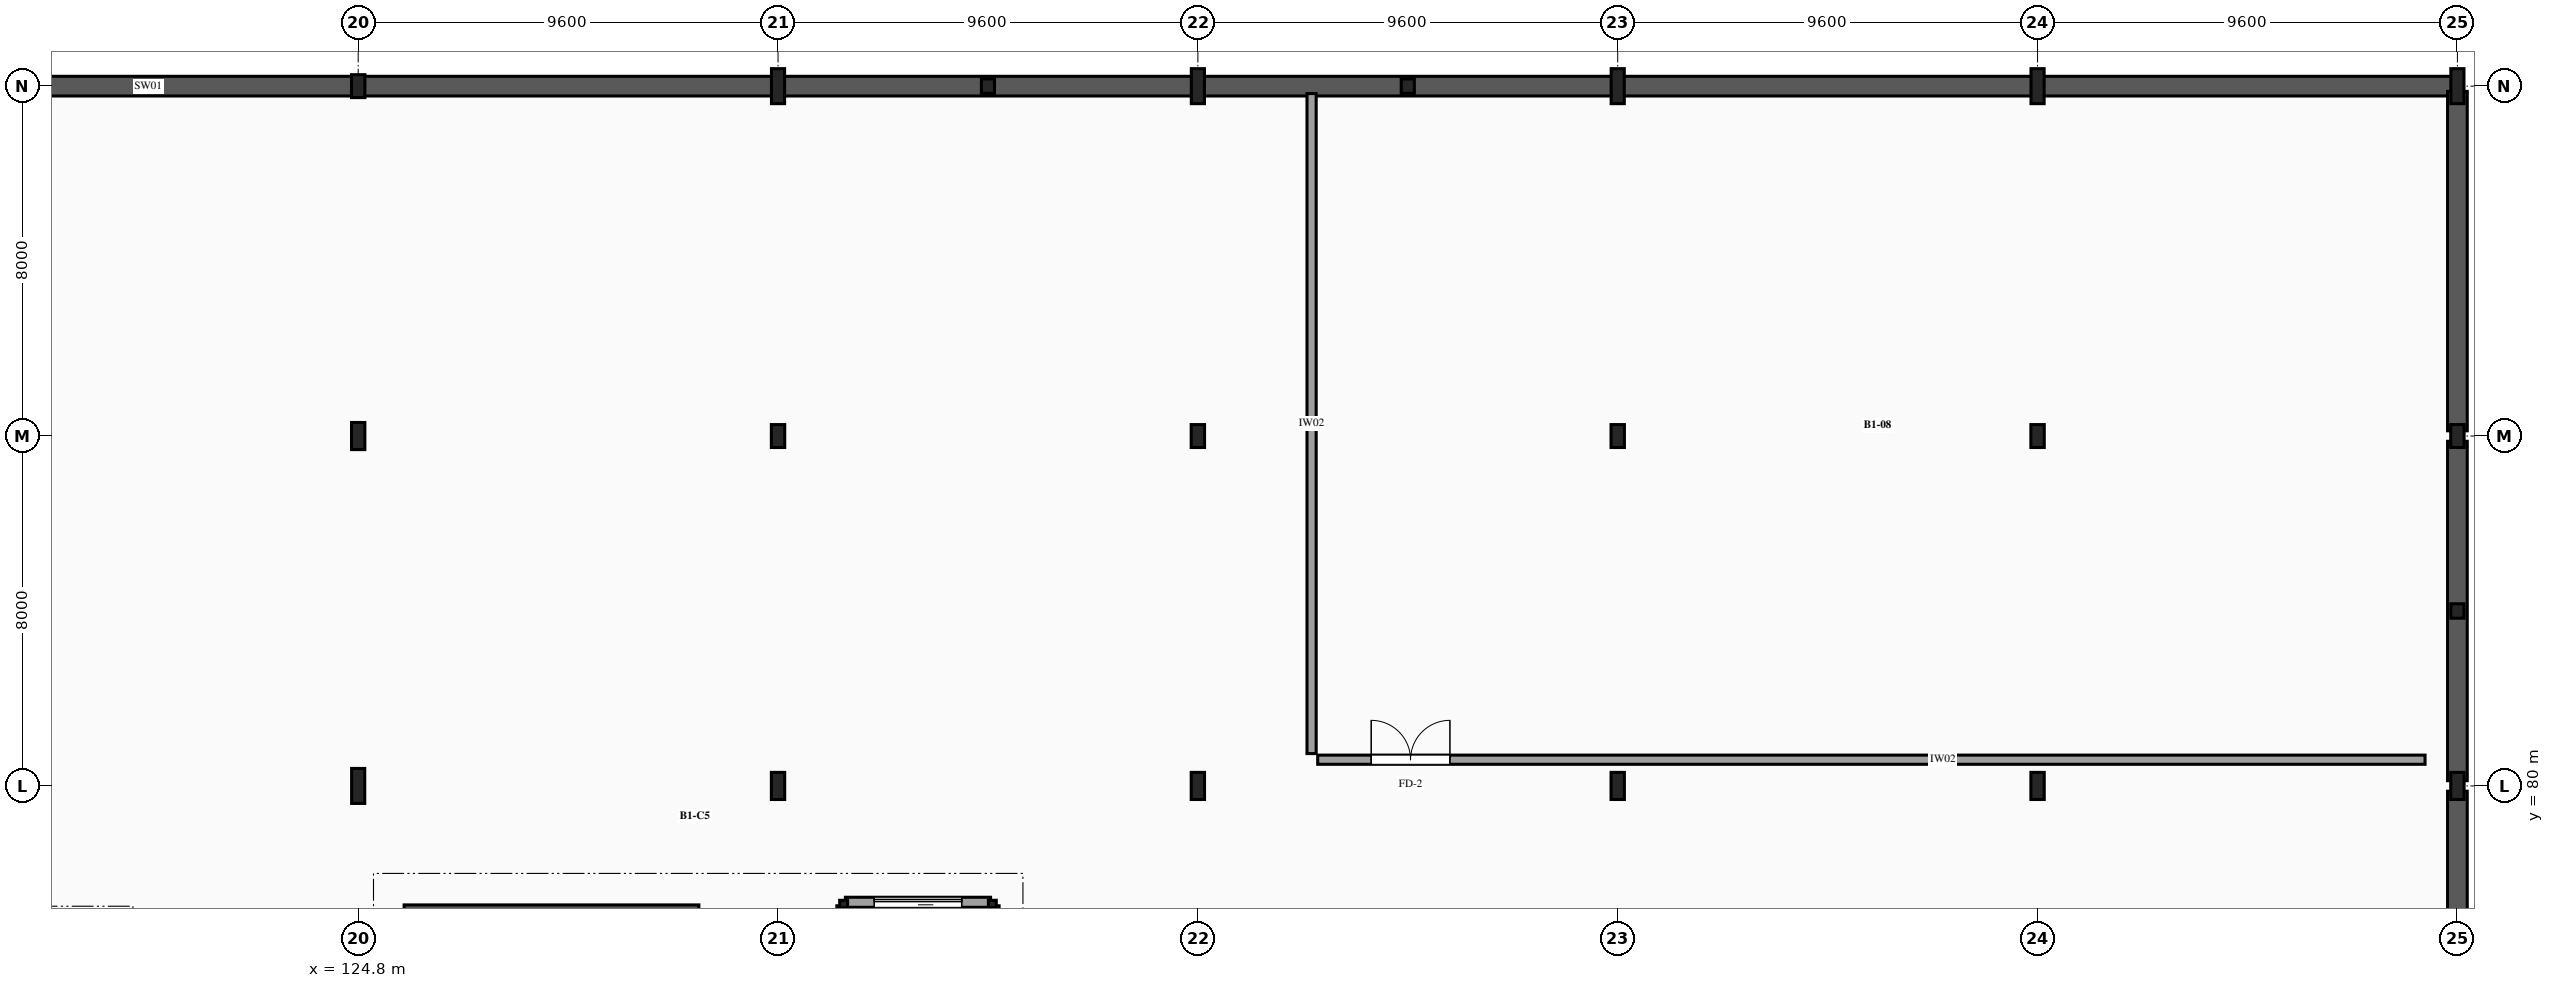
"""IFC4 building model, lengths in metres.
Left out: names, types, materials, properties, quantities, classifications, styles, units other than length and angle.
Written with IfcOpenShell. Run it as: python <this file> out.ifc"""

import sys

from ifc_helpers import new_model, si_unit, direction, frame, frame_2d, origin, origin_2d, place, context, subcontext, project, spatial, rectangle, i_section, extrude, element, fill, save


model = new_model("IFC4")
c1 = context("Model", 3, precision=1e-05, world=origin(), true_north=direction((0.0, 1.0)))
c2 = subcontext(c1, "Body", "Model", "MODEL_VIEW")
j1 = project(units=[si_unit("LENGTHUNIT", "METRE"), si_unit("PLANEANGLEUNIT", "RADIAN")], contexts=[c1])
p1 = place(None, origin())
s1 = spatial("IfcSite", under=j1, at=p1, CompositionType="ELEMENT")
p2 = place(p1, origin())
s2 = spatial("IfcBuilding", under=s1, at=p2, CompositionType="ELEMENT")
p3 = place(p2, frame((0.0, 0.0, -4.5)))
s3 = spatial("IfcBuildingStorey", under=s2, at=p3, CompositionType="ELEMENT", Elevation=-4.5)
p4 = place(p3, frame((124.8, 80.0, 0.0), z_axis=(0.0, 0.0, 1.0), x_axis=(1.0, 0.0, 0.0)))
e1 = element("IfcColumn", 1, at=p4, inside=s3, PredefinedType="COLUMN", context=c2, shape_type="SweptSolid", body=[
    extrude(i_section(OverallWidth=0.3, OverallDepth=0.8, WebThickness=0.018, FlangeThickness=0.033, FilletRadius=0.03, at=origin_2d()), origin(), (0.0, 0.0, 1.0), 4.22),
])
p5 = place(p3, frame((124.8, 88.0, 0.0), z_axis=(0.0, 0.0, 1.0), x_axis=(1.0, 0.0, 0.0)))
e2 = element("IfcColumn", 2, at=p5, inside=s3, PredefinedType="COLUMN", context=c2, shape_type="SweptSolid", body=[
    extrude(i_section(OverallWidth=0.305, OverallDepth=0.62, WebThickness=0.021, FlangeThickness=0.04, FilletRadius=0.027, at=origin_2d()), origin(), (0.0, 0.0, 1.0), 4.22),
])
p6 = place(p3, frame((124.8, 96.0, 0.0), z_axis=(0.0, 0.0, 1.0), x_axis=(1.0, 0.0, 0.0)))
e3 = element("IfcColumn", 3, at=p6, inside=s3, PredefinedType="COLUMN", context=c2, shape_type="SweptSolid", body=[
    extrude(i_section(OverallWidth=0.306, OverallDepth=0.524, WebThickness=0.021, FlangeThickness=0.04, FilletRadius=0.027, at=origin_2d()), origin(), (0.0, 0.0, 1.0), 4.22),
])
p7 = place(p3, frame((134.4, 80.0, 0.0), z_axis=(0.0, 0.0, 1.0), x_axis=(1.0, 0.0, 0.0)))
e4 = element("IfcColumn", 4, at=p7, inside=s3, PredefinedType="COLUMN", context=c2, shape_type="SweptSolid", body=[
    extrude(i_section(OverallWidth=0.305, OverallDepth=0.62, WebThickness=0.021, FlangeThickness=0.04, FilletRadius=0.027, at=origin_2d()), origin(), (0.0, 0.0, 1.0), 4.22),
])
p8 = place(p3, frame((134.4, 88.0, 0.0), z_axis=(0.0, 0.0, 1.0), x_axis=(1.0, 0.0, 0.0)))
e5 = element("IfcColumn", 5, at=p8, inside=s3, PredefinedType="COLUMN", context=c2, shape_type="SweptSolid", body=[
    extrude(i_section(OverallWidth=0.306, OverallDepth=0.524, WebThickness=0.021, FlangeThickness=0.04, FilletRadius=0.027, at=origin_2d()), origin(), (0.0, 0.0, 1.0), 4.22),
])
p9 = place(p3, frame((134.4, 96.0, 0.0), z_axis=(0.0, 0.0, 1.0), x_axis=(1.0, 0.0, 0.0)))
e6 = element("IfcColumn", 6, at=p9, inside=s3, PredefinedType="COLUMN", context=c2, shape_type="SweptSolid", body=[
    extrude(i_section(OverallWidth=0.3, OverallDepth=0.8, WebThickness=0.018, FlangeThickness=0.033, FilletRadius=0.03, at=origin_2d()), origin(), (0.0, 0.0, 1.0), 4.22),
])
p10 = place(p3, frame((144.0, 80.0, 0.0), z_axis=(0.0, 0.0, 1.0), x_axis=(1.0, 0.0, 0.0)))
e7 = element("IfcColumn", 7, at=p10, inside=s3, PredefinedType="COLUMN", context=c2, shape_type="SweptSolid", body=[
    extrude(i_section(OverallWidth=0.305, OverallDepth=0.62, WebThickness=0.021, FlangeThickness=0.04, FilletRadius=0.027, at=origin_2d()), origin(), (0.0, 0.0, 1.0), 4.22),
])
p11 = place(p3, frame((144.0, 88.0, 0.0), z_axis=(0.0, 0.0, 1.0), x_axis=(1.0, 0.0, 0.0)))
e8 = element("IfcColumn", 8, at=p11, inside=s3, PredefinedType="COLUMN", context=c2, shape_type="SweptSolid", body=[
    extrude(i_section(OverallWidth=0.306, OverallDepth=0.524, WebThickness=0.021, FlangeThickness=0.04, FilletRadius=0.027, at=origin_2d()), origin(), (0.0, 0.0, 1.0), 4.22),
])
p12 = place(p3, frame((144.0, 96.0, 0.0), z_axis=(0.0, 0.0, 1.0), x_axis=(1.0, 0.0, 0.0)))
e9 = element("IfcColumn", 9, at=p12, inside=s3, PredefinedType="COLUMN", context=c2, shape_type="SweptSolid", body=[
    extrude(i_section(OverallWidth=0.3, OverallDepth=0.8, WebThickness=0.018, FlangeThickness=0.033, FilletRadius=0.03, at=origin_2d()), origin(), (0.0, 0.0, 1.0), 4.22),
])
p13 = place(p3, frame((153.6, 80.0, 0.0), z_axis=(0.0, 0.0, 1.0), x_axis=(1.0, 0.0, 0.0)))
e10 = element("IfcColumn", 10, at=p13, inside=s3, PredefinedType="COLUMN", context=c2, shape_type="SweptSolid", body=[
    extrude(i_section(OverallWidth=0.305, OverallDepth=0.62, WebThickness=0.021, FlangeThickness=0.04, FilletRadius=0.027, at=origin_2d()), origin(), (0.0, 0.0, 1.0), 4.22),
])
p14 = place(p3, frame((153.6, 88.0, 0.0), z_axis=(0.0, 0.0, 1.0), x_axis=(1.0, 0.0, 0.0)))
e11 = element("IfcColumn", 11, at=p14, inside=s3, PredefinedType="COLUMN", context=c2, shape_type="SweptSolid", body=[
    extrude(i_section(OverallWidth=0.306, OverallDepth=0.524, WebThickness=0.021, FlangeThickness=0.04, FilletRadius=0.027, at=origin_2d()), origin(), (0.0, 0.0, 1.0), 4.22),
])
p15 = place(p3, frame((153.6, 96.0, 0.0), z_axis=(0.0, 0.0, 1.0), x_axis=(1.0, 0.0, 0.0)))
e12 = element("IfcColumn", 12, at=p15, inside=s3, PredefinedType="COLUMN", context=c2, shape_type="SweptSolid", body=[
    extrude(i_section(OverallWidth=0.3, OverallDepth=0.8, WebThickness=0.018, FlangeThickness=0.033, FilletRadius=0.03, at=origin_2d()), origin(), (0.0, 0.0, 1.0), 4.22),
])
p16 = place(p3, frame((163.2, 80.0, 0.0), z_axis=(0.0, 0.0, 1.0), x_axis=(1.0, 0.0, 0.0)))
e13 = element("IfcColumn", 13, at=p16, inside=s3, PredefinedType="COLUMN", context=c2, shape_type="SweptSolid", body=[
    extrude(i_section(OverallWidth=0.305, OverallDepth=0.62, WebThickness=0.021, FlangeThickness=0.04, FilletRadius=0.027, at=origin_2d()), origin(), (0.0, 0.0, 1.0), 4.22),
])
p17 = place(p3, frame((163.2, 88.0, 0.0), z_axis=(0.0, 0.0, 1.0), x_axis=(1.0, 0.0, 0.0)))
e14 = element("IfcColumn", 14, at=p17, inside=s3, PredefinedType="COLUMN", context=c2, shape_type="SweptSolid", body=[
    extrude(i_section(OverallWidth=0.306, OverallDepth=0.524, WebThickness=0.021, FlangeThickness=0.04, FilletRadius=0.027, at=origin_2d()), origin(), (0.0, 0.0, 1.0), 4.22),
])
p18 = place(p3, frame((163.2, 96.0, 0.0), z_axis=(0.0, 0.0, 1.0), x_axis=(1.0, 0.0, 0.0)))
e15 = element("IfcColumn", 15, at=p18, inside=s3, PredefinedType="COLUMN", context=c2, shape_type="SweptSolid", body=[
    extrude(i_section(OverallWidth=0.3, OverallDepth=0.8, WebThickness=0.018, FlangeThickness=0.033, FilletRadius=0.03, at=origin_2d()), origin(), (0.0, 0.0, 1.0), 4.22),
])
p19 = place(p3, frame((172.8, 80.0, 0.0), z_axis=(0.0, 0.0, 1.0), x_axis=(1.0, 0.0, 0.0)))
e16 = element("IfcColumn", 16, at=p19, inside=s3, PredefinedType="COLUMN", context=c2, shape_type="SweptSolid", body=[
    extrude(i_section(OverallWidth=0.305, OverallDepth=0.62, WebThickness=0.021, FlangeThickness=0.04, FilletRadius=0.027, at=origin_2d()), origin(), (0.0, 0.0, 1.0), 4.22),
])
p20 = place(p3, frame((172.8, 88.0, 0.0), z_axis=(0.0, 0.0, 1.0), x_axis=(1.0, 0.0, 0.0)))
e17 = element("IfcColumn", 17, at=p20, inside=s3, PredefinedType="COLUMN", context=c2, shape_type="SweptSolid", body=[
    extrude(i_section(OverallWidth=0.306, OverallDepth=0.524, WebThickness=0.021, FlangeThickness=0.04, FilletRadius=0.027, at=origin_2d()), origin(), (0.0, 0.0, 1.0), 4.22),
])
p21 = place(p3, frame((172.8, 96.0, 0.0), z_axis=(0.0, 0.0, 1.0), x_axis=(1.0, 0.0, 0.0)))
e18 = element("IfcColumn", 18, at=p21, inside=s3, PredefinedType="COLUMN", context=c2, shape_type="SweptSolid", body=[
    extrude(i_section(OverallWidth=0.3, OverallDepth=0.8, WebThickness=0.018, FlangeThickness=0.033, FilletRadius=0.03, at=origin_2d()), origin(), (0.0, 0.0, 1.0), 4.22),
])
for number, where, z_axis, x_axis in (
    (19, (172.8, 84.0, 0.0), (0.0, 0.0, 1.0), (1.0, 0.0, 0.0)),
    (20, (139.2, 96.0, 0.0), (0.0, 0.0, 1.0), (1.0, 0.0, 0.0)),
    (21, (148.8, 96.0, 0.0), (0.0, 0.0, 1.0), (1.0, 0.0, 0.0)),
):
    element("IfcColumn", number, at=place(p3, frame(where, z_axis=z_axis, x_axis=x_axis)), inside=s3, PredefinedType="PILASTER", context=c2, shape_type="SweptSolid", body=[
        extrude(i_section(OverallWidth=0.3, OverallDepth=0.33, WebThickness=0.01, FlangeThickness=0.017, FilletRadius=0.027, at=origin_2d()), origin(), (0.0, 0.0, 1.0), 4.22),
    ])
p22 = place(p3, frame((115.32, 96.0, 0.0), z_axis=(0.0, 0.0, 1.0), x_axis=(1.0, 0.0, 0.0)))
e22 = element("IfcWall", 22, at=p22, inside=s3, PredefinedType="SHEAR", context=c2, shape_type="SweptSolid", body=[
    extrude(rectangle(XDim=9.36, YDim=0.45, at=frame_2d((4.68, 0.0))), origin(), (0.0, 0.0, 1.0), 4.22),
])
p23 = place(p3, frame((124.92, 96.0, 0.0), z_axis=(0.0, 0.0, 1.0), x_axis=(1.0, 0.0, 0.0)))
e23 = element("IfcWall", 23, at=p23, inside=s3, PredefinedType="SHEAR", context=c2, shape_type="SweptSolid", body=[
    extrude(rectangle(XDim=9.36, YDim=0.45, at=frame_2d((4.68, 0.0))), origin(), (0.0, 0.0, 1.0), 4.22),
])
for number, where, z_axis, x_axis in (
    (24, (134.52, 96.0, 0.0), (0.0, 0.0, 1.0), (1.0, 0.0, 0.0)),
    (25, (144.12, 96.0, 0.0), (0.0, 0.0, 1.0), (1.0, 0.0, 0.0)),
):
    element("IfcWall", number, at=place(p3, frame(where, z_axis=z_axis, x_axis=x_axis)), inside=s3, PredefinedType="SHEAR", context=c2, shape_type="SweptSolid", body=[
        extrude(rectangle(XDim=9.36, YDim=0.45, at=frame_2d((4.68, 0.0))), origin(), (0.0, 0.0, 1.0), 4.22),
    ])
p24 = place(p3, frame((153.72, 96.0, 0.0), z_axis=(0.0, 0.0, 1.0), x_axis=(1.0, 0.0, 0.0)))
e26 = element("IfcWall", 26, at=p24, inside=s3, PredefinedType="SHEAR", context=c2, shape_type="SweptSolid", body=[
    extrude(rectangle(XDim=9.36, YDim=0.45, at=frame_2d((4.68, 0.0))), origin(), (0.0, 0.0, 1.0), 4.22),
])
p25 = place(p3, frame((163.32, 96.0, 0.0), z_axis=(0.0, 0.0, 1.0), x_axis=(1.0, 0.0, 0.0)))
e27 = element("IfcWall", 27, at=p25, inside=s3, PredefinedType="SHEAR", context=c2, shape_type="SweptSolid", body=[
    extrude(rectangle(XDim=9.36, YDim=0.45, at=frame_2d((4.68, 0.0))), origin(), (0.0, 0.0, 1.0), 4.22),
])
for number, where, z_axis, x_axis in (
    (28, (172.8, 72.12, 0.0), (0.0, 0.0, 1.0), (0.0, 1.0, 0.0)),
    (29, (172.8, 80.12, 0.0), (0.0, 0.0, 1.0), (0.0, 1.0, 0.0)),
    (30, (172.8, 88.12, 0.0), (0.0, 0.0, 1.0), (0.0, 1.0, 0.0)),
):
    element("IfcWall", number, at=place(p3, frame(where, z_axis=z_axis, x_axis=x_axis)), inside=s3, PredefinedType="SHEAR", context=c2, shape_type="SweptSolid", body=[
        extrude(rectangle(XDim=7.76, YDim=0.45, at=frame_2d((3.88, 0.0))), origin(), (0.0, 0.0, 1.0), 4.22),
    ])
p26 = place(p3, frame((125.85, 77.12, 0.0), z_axis=(0.0, 0.0, 1.0), x_axis=(1.0, 0.0, 0.0)))
e31 = element("IfcWall", 31, at=p26, inside=s3, PredefinedType="SHEAR", context=c2, shape_type="SweptSolid", body=[
    extrude(rectangle(XDim=6.74, YDim=0.32, at=frame_2d((3.37, 0.0))), origin(), (0.0, 0.0, 1.0), 4.22),
])
for number, where, z_axis, x_axis in (
    (32, (139.3, 77.3, 0.0), (0.0, 0.0, 1.0), (1.0, 0.0, 0.0)),
    (33, (135.9, 77.3, 0.0), (0.0, 0.0, 1.0), (1.0, 0.0, 0.0)),
):
    element("IfcColumn", number, at=place(p3, frame(where, z_axis=z_axis, x_axis=x_axis)), inside=s3, PredefinedType="COLUMN", context=c2, shape_type="SweptSolid", body=[
        extrude(i_section(OverallWidth=0.18, OverallDepth=0.171, WebThickness=0.006, FlangeThickness=0.01, FilletRadius=0.015, at=origin_2d()), origin(), (0.0, 0.0, 1.0), 4.5),
    ])
p27 = place(p3, frame((135.94, 77.34, 0.0), z_axis=(0.0, 0.0, 1.0), x_axis=(1.0, 0.0, 0.0)))
e34 = element("IfcWall", 34, at=p27, inside=s3, PredefinedType="SOLIDWALL", context=c2, shape_type="SweptSolid", body=[
    extrude(rectangle(XDim=3.32, YDim=0.23, at=frame_2d((1.66, 0.0))), origin(), (0.0, 0.0, 1.0), 3.58),
])
p28 = place(p27, frame((0.66, 0.0, 0.0)))
e35 = element("IfcOpeningElement", 35, at=p28, cuts=e34, PredefinedType="OPENING", context=c2, shape_type="SweptSolid", body=[
    extrude(rectangle(XDim=2.0, YDim=2.5, at=frame_2d((1.0, 1.25))), frame((0.0, 0.125, 0.0), z_axis=(0.0, -1.0, 0.0), x_axis=(1.0, 0.0, 0.0)), (0.0, 0.0, 1.0), 0.25),
])
for number, where, z_axis, x_axis in (
    (36, (135.86, 73.14, 0.0), (0.0, 0.0, 1.0), (0.0, 1.0, 0.0)),
    (37, (139.34, 73.14, 0.0), (0.0, 0.0, 1.0), (0.0, 1.0, 0.0)),
):
    element("IfcWall", number, at=place(p3, frame(where, z_axis=z_axis, x_axis=x_axis)), inside=s3, PredefinedType="SOLIDWALL", context=c2, shape_type="SweptSolid", body=[
        extrude(rectangle(XDim=4.12, YDim=0.23, at=frame_2d((2.06, 0.0))), origin(), (0.0, 0.0, 1.0), 3.58),
    ])
p29 = place(p3, frame((146.74, 80.6, 0.0), z_axis=(0.0, 0.0, 1.0), x_axis=(1.0, 0.0, 0.0)))
e38 = element("IfcWall", 38, at=p29, inside=s3, PredefinedType="SOLIDWALL", context=c2, shape_type="SweptSolid", body=[
    extrude(rectangle(XDim=25.32, YDim=0.21, at=frame_2d((12.66, 0.0))), origin(), (0.0, 0.0, 1.0), 3.58),
])
p30 = place(p29, frame((1.223, 0.0, 0.0)))
e39 = element("IfcOpeningElement", 39, at=p30, cuts=e38, PredefinedType="OPENING", context=c2, shape_type="SweptSolid", body=[
    extrude(rectangle(XDim=1.8, YDim=2.4, at=frame_2d((0.9, 1.2))), frame((0.0, 0.115, 0.0), z_axis=(0.0, -1.0, 0.0), x_axis=(1.0, 0.0, 0.0)), (0.0, 0.0, 1.0), 0.23),
])
p31 = place(p3, frame((146.6, 80.74, 0.0), z_axis=(0.0, 0.0, 1.0), x_axis=(0.0, 1.0, 0.0)))
e40 = element("IfcWall", 40, at=p31, inside=s3, PredefinedType="SOLIDWALL", context=c2, shape_type="SweptSolid", body=[
    extrude(rectangle(XDim=15.09, YDim=0.21, at=frame_2d((7.545, 0.0))), origin(), (0.0, 0.0, 1.0), 3.58),
])
p32 = place(p28, origin())
e41 = element("IfcDoor", 41, at=p32, inside=s3, OperationType="SLIDING_TO_RIGHT", PredefinedType="DOOR", context=c2, shape_type="SweptSolid", body=[
    extrude(rectangle(XDim=2.0, YDim=2.5, at=frame_2d((1.0, 1.25))), frame((0.0, 0.025, 0.0), z_axis=(0.0, -1.0, 0.0), x_axis=(1.0, 0.0, 0.0)), (0.0, 0.0, 1.0), 0.05),
])
fill(e35, e41)
p33 = place(p30, origin())
e42 = element("IfcDoor", 42, at=p33, inside=s3, OperationType="DOUBLE_DOOR_SINGLE_SWING", PredefinedType="DOOR", context=c2, shape_type="SweptSolid", body=[
    extrude(rectangle(XDim=1.8, YDim=2.4, at=frame_2d((0.9, 1.2))), frame((0.0, 0.025, 0.0), z_axis=(0.0, -1.0, 0.0), x_axis=(1.0, 0.0, 0.0)), (0.0, 0.0, 1.0), 0.05),
])
fill(e39, e42)
save(model, sys.argv[1])
